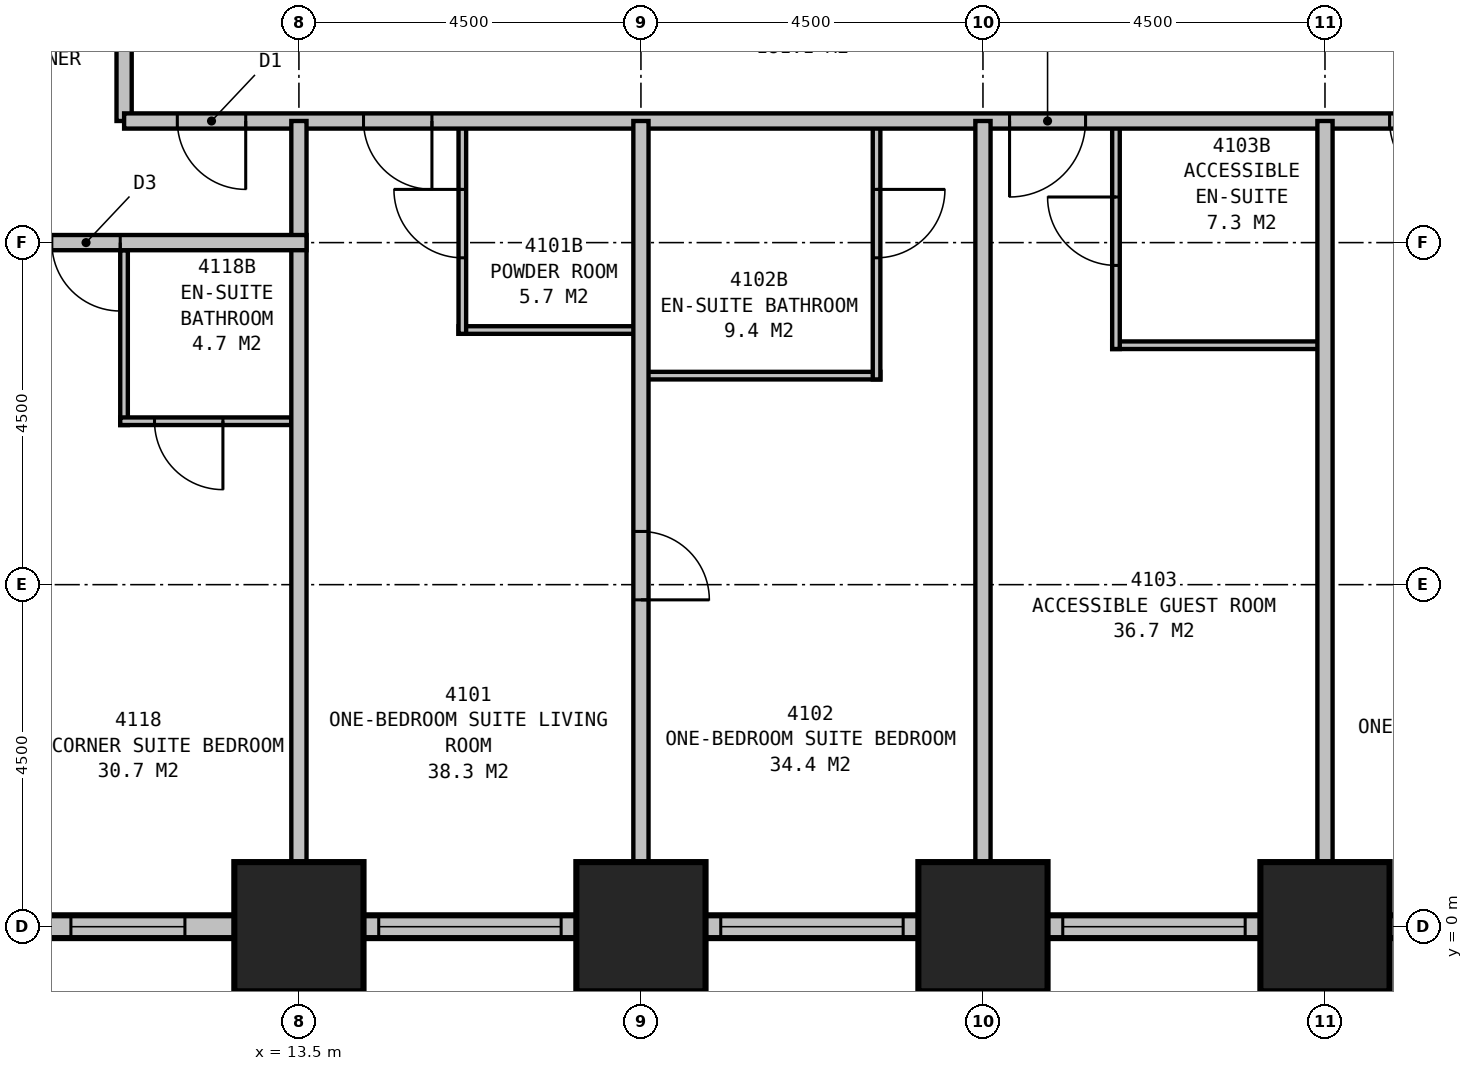
"""IFC4 building model, lengths in metres.
Left out: names, types, materials, properties, quantities, classifications, styles, units other than length and angle.
Written with IfcOpenShell. Run it as: python <this file> out.ifc"""

import sys

from ifc_helpers import new_model, si_unit, direction, frame, frame_2d, origin, origin_2d, place, context, subcontext, project, spatial, rectangle, extrude, element, fill, save


model = new_model("IFC4")
c1 = context("Model", 3, precision=1e-05, world=origin(), true_north=direction((0.0, 1.0)))
c2 = subcontext(c1, "Body", "Model", "MODEL_VIEW")
j1 = project(units=[si_unit("LENGTHUNIT", "METRE"), si_unit("PLANEANGLEUNIT", "RADIAN")], contexts=[c1])
p1 = place(None, origin())
s1 = spatial("IfcSite", under=j1, at=p1, CompositionType="ELEMENT")
p2 = place(p1, origin())
s2 = spatial("IfcBuilding", under=s1, at=p2, CompositionType="ELEMENT")
p3 = place(p2, frame((0.0, 0.0, 162.4)))
s3 = spatial("IfcBuildingStorey", under=s2, at=p3, CompositionType="ELEMENT", Elevation=162.4)
for number, where, z_axis, x_axis in (
    (1, (13.5, 0.0, 0.0), (0.0, 0.0, 1.0), (1.0, 0.0, 0.0)),
    (2, (18.0, 0.0, 0.0), (0.0, 0.0, 1.0), (1.0, 0.0, 0.0)),
    (3, (22.5, 0.0, 0.0), (0.0, 0.0, 1.0), (1.0, 0.0, 0.0)),
    (4, (27.0, 0.0, 0.0), (0.0, 0.0, 1.0), (1.0, 0.0, 0.0)),
):
    element("IfcColumn", number, at=place(p3, frame(where, z_axis=z_axis, x_axis=x_axis)), inside=s3, PredefinedType="COLUMN", context=c2, shape_type="SweptSolid", body=[
        extrude(rectangle(XDim=1.7, YDim=1.7, at=origin_2d()), origin(), (0.0, 0.0, 1.0), 3.5),
    ])
p4 = place(p3, frame((8.85, 0.0, 0.0), z_axis=(0.0, 0.0, 1.0), x_axis=(1.0, 0.0, 0.0)))
e5 = element("IfcWall", 5, at=p4, inside=s3, PredefinedType="STANDARD", context=c2, shape_type="SweptSolid", body=[
    extrude(rectangle(XDim=36.3, YDim=0.3, at=frame_2d((18.15, 0.0))), origin(), (0.0, 0.0, 1.0), 2.25),
])
p5 = place(p4, frame((1.65, 0.0, 0.5)))
e6 = element("IfcOpeningElement", 6, at=p5, cuts=e5, PredefinedType="OPENING", context=c2, shape_type="SweptSolid", body=[
    extrude(rectangle(XDim=1.5, YDim=1.6, at=frame_2d((0.75, 0.8))), frame((0.0, 0.16, 0.0), z_axis=(0.0, -1.0, 0.0), x_axis=(1.0, 0.0, 0.0)), (0.0, 0.0, 1.0), 0.32),
])
p6 = place(p4, frame((5.7, 0.0, 0.5)))
e7 = element("IfcOpeningElement", 7, at=p6, cuts=e5, PredefinedType="OPENING", context=c2, shape_type="SweptSolid", body=[
    extrude(rectangle(XDim=2.4, YDim=1.6, at=frame_2d((1.2, 0.8))), frame((0.0, 0.16, 0.0), z_axis=(0.0, -1.0, 0.0), x_axis=(1.0, 0.0, 0.0)), (0.0, 0.0, 1.0), 0.32),
])
p7 = place(p4, frame((10.2, 0.0, 0.5)))
e8 = element("IfcOpeningElement", 8, at=p7, cuts=e5, PredefinedType="OPENING", context=c2, shape_type="SweptSolid", body=[
    extrude(rectangle(XDim=2.4, YDim=1.6, at=frame_2d((1.2, 0.8))), frame((0.0, 0.16, 0.0), z_axis=(0.0, -1.0, 0.0), x_axis=(1.0, 0.0, 0.0)), (0.0, 0.0, 1.0), 0.32),
])
p8 = place(p4, frame((14.7, 0.0, 0.5)))
e9 = element("IfcOpeningElement", 9, at=p8, cuts=e5, PredefinedType="OPENING", context=c2, shape_type="SweptSolid", body=[
    extrude(rectangle(XDim=2.4, YDim=1.6, at=frame_2d((1.2, 0.8))), frame((0.0, 0.16, 0.0), z_axis=(0.0, -1.0, 0.0), x_axis=(1.0, 0.0, 0.0)), (0.0, 0.0, 1.0), 0.32),
])
p9 = place(p4, frame((19.2, 0.0, 0.5)))
e10 = element("IfcOpeningElement", 10, at=p9, cuts=e5, PredefinedType="OPENING", context=c2, shape_type="SweptSolid", body=[
    extrude(rectangle(XDim=2.4, YDim=1.6, at=frame_2d((1.2, 0.8))), frame((0.0, 0.16, 0.0), z_axis=(0.0, -1.0, 0.0), x_axis=(1.0, 0.0, 0.0)), (0.0, 0.0, 1.0), 0.32),
])
p10 = place(p4, frame((23.7, 0.0, 0.5)))
e11 = element("IfcOpeningElement", 11, at=p10, cuts=e5, PredefinedType="OPENING", context=c2, shape_type="SweptSolid", body=[
    extrude(rectangle(XDim=2.4, YDim=1.6, at=frame_2d((1.2, 0.8))), frame((0.0, 0.16, 0.0), z_axis=(0.0, -1.0, 0.0), x_axis=(1.0, 0.0, 0.0)), (0.0, 0.0, 1.0), 0.32),
])
p11 = place(p4, frame((28.2, 0.0, 0.5)))
e12 = element("IfcOpeningElement", 12, at=p11, cuts=e5, PredefinedType="OPENING", context=c2, shape_type="SweptSolid", body=[
    extrude(rectangle(XDim=2.4, YDim=1.6, at=frame_2d((1.2, 0.8))), frame((0.0, 0.16, 0.0), z_axis=(0.0, -1.0, 0.0), x_axis=(1.0, 0.0, 0.0)), (0.0, 0.0, 1.0), 0.32),
])
p12 = place(p4, frame((32.7, 0.0, 0.5)))
e13 = element("IfcOpeningElement", 13, at=p12, cuts=e5, PredefinedType="OPENING", context=c2, shape_type="SweptSolid", body=[
    extrude(rectangle(XDim=2.4, YDim=1.6, at=frame_2d((1.2, 0.8))), frame((0.0, 0.16, 0.0), z_axis=(0.0, -1.0, 0.0), x_axis=(1.0, 0.0, 0.0)), (0.0, 0.0, 1.0), 0.32),
])
p13 = place(p3, frame((11.2, 10.6, 0.0), z_axis=(0.0, 0.0, 1.0), x_axis=(1.0, 0.0, 0.0)))
e14 = element("IfcWall", 14, at=p13, inside=s3, PredefinedType="PARTITIONING", context=c2, shape_type="SweptSolid", body=[
    extrude(rectangle(XDim=27.1, YDim=0.2, at=frame_2d((13.55, 0.0))), origin(), (0.0, 0.0, 1.0), 3.25),
])
p14 = place(p13, frame((4.05, 0.0, 0.0), z_axis=(0.0, 0.0, 1.0), x_axis=(-1.0, 0.0, 0.0)))
e15 = element("IfcOpeningElement", 15, at=p14, cuts=e14, PredefinedType="OPENING", context=c2, shape_type="SweptSolid", body=[
    extrude(rectangle(XDim=0.9, YDim=2.1, at=frame_2d((0.45, 1.05))), frame((0.0, 0.11, 0.0), z_axis=(0.0, -1.0, 0.0), x_axis=(1.0, 0.0, 0.0)), (0.0, 0.0, 1.0), 0.22),
])
p15 = place(p13, frame((12.65, 0.0, 0.0), z_axis=(0.0, 0.0, 1.0), x_axis=(-1.0, 0.0, 0.0)))
e16 = element("IfcOpeningElement", 16, at=p15, cuts=e14, PredefinedType="OPENING", context=c2, shape_type="SweptSolid", body=[
    extrude(rectangle(XDim=1.0, YDim=2.1, at=frame_2d((0.5, 1.05))), frame((0.0, 0.11, 0.0), z_axis=(0.0, -1.0, 0.0), x_axis=(1.0, 0.0, 0.0)), (0.0, 0.0, 1.0), 0.22),
])
p16 = place(p13, frame((17.55, 0.0, 0.0), z_axis=(0.0, 0.0, 1.0), x_axis=(-1.0, 0.0, 0.0)))
e17 = element("IfcOpeningElement", 17, at=p16, cuts=e14, PredefinedType="OPENING", context=c2, shape_type="SweptSolid", body=[
    extrude(rectangle(XDim=0.9, YDim=2.1, at=frame_2d((0.45, 1.05))), frame((0.0, 0.11, 0.0), z_axis=(0.0, -1.0, 0.0), x_axis=(1.0, 0.0, 0.0)), (0.0, 0.0, 1.0), 0.22),
])
p17 = place(p13, frame((1.6, 0.0, 0.0), z_axis=(0.0, 0.0, 1.0), x_axis=(-1.0, 0.0, 0.0)))
e18 = element("IfcOpeningElement", 18, at=p17, cuts=e14, PredefinedType="OPENING", context=c2, shape_type="SweptSolid", body=[
    extrude(rectangle(XDim=0.9, YDim=2.1, at=frame_2d((0.45, 1.05))), frame((0.0, 0.11, 0.0), z_axis=(0.0, -1.0, 0.0), x_axis=(1.0, 0.0, 0.0)), (0.0, 0.0, 1.0), 0.22),
])
p18 = place(p13, frame((26.4, 0.0, 0.0), z_axis=(0.0, 0.0, 1.0), x_axis=(-1.0, 0.0, 0.0)))
e19 = element("IfcOpeningElement", 19, at=p18, cuts=e14, PredefinedType="OPENING", context=c2, shape_type="SweptSolid", body=[
    extrude(rectangle(XDim=0.9, YDim=2.1, at=frame_2d((0.45, 1.05))), frame((0.0, 0.11, 0.0), z_axis=(0.0, -1.0, 0.0), x_axis=(1.0, 0.0, 0.0)), (0.0, 0.0, 1.0), 0.22),
])
p19 = place(p3, frame((11.2, 10.6, 0.0), z_axis=(0.0, 0.0, 1.0), x_axis=(0.0, 1.0, 0.0)))
e20 = element("IfcWall", 20, at=p19, inside=s3, PredefinedType="PARTITIONING", context=c2, shape_type="SweptSolid", body=[
    extrude(rectangle(XDim=18.7, YDim=0.2, at=frame_2d((9.35, 0.0))), origin(), (0.0, 0.0, 1.0), 3.25),
])
p20 = place(p19, frame((6.05, 0.0, 0.0)))
e21 = element("IfcOpeningElement", 21, at=p20, cuts=e20, PredefinedType="OPENING", context=c2, shape_type="SweptSolid", body=[
    extrude(rectangle(XDim=0.9, YDim=2.1, at=frame_2d((0.45, 1.05))), frame((0.0, 0.11, 0.0), z_axis=(0.0, -1.0, 0.0), x_axis=(1.0, 0.0, 0.0)), (0.0, 0.0, 1.0), 0.22),
])
p21 = place(p19, frame((10.55, 0.0, 0.0)))
e22 = element("IfcOpeningElement", 22, at=p21, cuts=e20, PredefinedType="OPENING", context=c2, shape_type="SweptSolid", body=[
    extrude(rectangle(XDim=0.9, YDim=2.1, at=frame_2d((0.45, 1.05))), frame((0.0, 0.11, 0.0), z_axis=(0.0, -1.0, 0.0), x_axis=(1.0, 0.0, 0.0)), (0.0, 0.0, 1.0), 0.22),
])
p22 = place(p19, frame((14.65, 0.0, 0.0)))
e23 = element("IfcOpeningElement", 23, at=p22, cuts=e20, PredefinedType="OPENING", context=c2, shape_type="SweptSolid", body=[
    extrude(rectangle(XDim=1.0, YDim=2.1, at=frame_2d((0.5, 1.05))), frame((0.0, 0.11, 0.0), z_axis=(0.0, -1.0, 0.0), x_axis=(1.0, 0.0, 0.0)), (0.0, 0.0, 1.0), 0.22),
])
p23 = place(p3, frame((18.0, 10.6, 0.0), z_axis=(0.0, 0.0, 1.0), x_axis=(0.0, -1.0, 0.0)))
e24 = element("IfcWall", 24, at=p23, inside=s3, PredefinedType="PARTITIONING", context=c2, shape_type="SweptSolid", body=[
    extrude(rectangle(XDim=10.6, YDim=0.2, at=frame_2d((5.3, 0.0))), origin(), (0.0, 0.0, 1.0), 2.25),
])
p24 = place(p23, frame((5.4, 0.0, 0.0)))
e25 = element("IfcOpeningElement", 25, at=p24, cuts=e24, PredefinedType="OPENING", context=c2, shape_type="SweptSolid", body=[
    extrude(rectangle(XDim=0.9, YDim=2.1, at=frame_2d((0.45, 1.05))), frame((0.0, 0.11, 0.0), z_axis=(0.0, -1.0, 0.0), x_axis=(1.0, 0.0, 0.0)), (0.0, 0.0, 1.0), 0.22),
])
for number, where, z_axis, x_axis in (
    (26, (22.5, 10.6, 0.0), (0.0, 0.0, 1.0), (0.0, -1.0, 0.0)),
    (27, (27.0, 10.6, 0.0), (0.0, 0.0, 1.0), (0.0, -1.0, 0.0)),
):
    element("IfcWall", number, at=place(p3, frame(where, z_axis=z_axis, x_axis=x_axis)), inside=s3, PredefinedType="PARTITIONING", context=c2, shape_type="SweptSolid", body=[
        extrude(rectangle(XDim=10.6, YDim=0.2, at=frame_2d((5.3, 0.0))), origin(), (0.0, 0.0, 1.0), 2.25),
    ])
p25 = place(p3, frame((15.6, 7.85, 0.0), z_axis=(0.0, 0.0, 1.0), x_axis=(1.0, 0.0, 0.0)))
e28 = element("IfcWall", 28, at=p25, inside=s3, PredefinedType="PLUMBINGWALL", context=c2, shape_type="SweptSolid", body=[
    extrude(rectangle(XDim=2.4, YDim=0.1, at=frame_2d((1.2, 0.0))), origin(), (0.0, 0.0, 1.0), 3.25),
])
p26 = place(p3, frame((15.65, 10.6, 0.0), z_axis=(0.0, 0.0, 1.0), x_axis=(0.0, -1.0, 0.0)))
e29 = element("IfcWall", 29, at=p26, inside=s3, PredefinedType="PLUMBINGWALL", context=c2, shape_type="SweptSolid", body=[
    extrude(rectangle(XDim=2.8, YDim=0.1, at=frame_2d((1.4, 0.0))), origin(), (0.0, 0.0, 1.0), 3.25),
])
p27 = place(p26, frame((1.8, 0.0, 0.0), z_axis=(0.0, 0.0, 1.0), x_axis=(-1.0, 0.0, 0.0)))
e30 = element("IfcOpeningElement", 30, at=p27, cuts=e29, PredefinedType="OPENING", context=c2, shape_type="SweptSolid", body=[
    extrude(rectangle(XDim=0.9, YDim=2.1, at=frame_2d((0.45, 1.05))), frame((0.0, 0.06, 0.0), z_axis=(0.0, -1.0, 0.0), x_axis=(1.0, 0.0, 0.0)), (0.0, 0.0, 1.0), 0.12),
])
p28 = place(p3, frame((18.0, 7.25, 0.0), z_axis=(0.0, 0.0, 1.0), x_axis=(1.0, 0.0, 0.0)))
e31 = element("IfcWall", 31, at=p28, inside=s3, PredefinedType="PLUMBINGWALL", context=c2, shape_type="SweptSolid", body=[
    extrude(rectangle(XDim=3.15, YDim=0.1, at=frame_2d((1.575, 0.0))), origin(), (0.0, 0.0, 1.0), 3.25),
])
p29 = place(p3, frame((21.1, 10.6, 0.0), z_axis=(0.0, 0.0, 1.0), x_axis=(0.0, -1.0, 0.0)))
e32 = element("IfcWall", 32, at=p29, inside=s3, PredefinedType="PLUMBINGWALL", context=c2, shape_type="SweptSolid", body=[
    extrude(rectangle(XDim=3.4, YDim=0.1, at=frame_2d((1.7, 0.0))), origin(), (0.0, 0.0, 1.0), 3.25),
])
p30 = place(p29, frame((0.9, 0.0, 0.0)))
e33 = element("IfcOpeningElement", 33, at=p30, cuts=e32, PredefinedType="OPENING", context=c2, shape_type="SweptSolid", body=[
    extrude(rectangle(XDim=0.9, YDim=2.1, at=frame_2d((0.45, 1.05))), frame((0.0, 0.06, 0.0), z_axis=(0.0, -1.0, 0.0), x_axis=(1.0, 0.0, 0.0)), (0.0, 0.0, 1.0), 0.12),
])
p31 = place(p3, frame((24.2, 7.65, 0.0), z_axis=(0.0, 0.0, 1.0), x_axis=(1.0, 0.0, 0.0)))
e34 = element("IfcWall", 34, at=p31, inside=s3, PredefinedType="PLUMBINGWALL", context=c2, shape_type="SweptSolid", body=[
    extrude(rectangle(XDim=2.8, YDim=0.1, at=frame_2d((1.4, 0.0))), origin(), (0.0, 0.0, 1.0), 3.25),
])
p32 = place(p3, frame((24.25, 10.6, 0.0), z_axis=(0.0, 0.0, 1.0), x_axis=(0.0, -1.0, 0.0)))
e35 = element("IfcWall", 35, at=p32, inside=s3, PredefinedType="PLUMBINGWALL", context=c2, shape_type="SweptSolid", body=[
    extrude(rectangle(XDim=3.0, YDim=0.1, at=frame_2d((1.5, 0.0))), origin(), (0.0, 0.0, 1.0), 3.25),
])
p33 = place(p32, frame((1.9, 0.0, 0.0), z_axis=(0.0, 0.0, 1.0), x_axis=(-1.0, 0.0, 0.0)))
e36 = element("IfcOpeningElement", 36, at=p33, cuts=e35, PredefinedType="OPENING", context=c2, shape_type="SweptSolid", body=[
    extrude(rectangle(XDim=0.9, YDim=2.1, at=frame_2d((0.45, 1.05))), frame((0.0, 0.06, 0.0), z_axis=(0.0, -1.0, 0.0), x_axis=(1.0, 0.0, 0.0)), (0.0, 0.0, 1.0), 0.12),
])
p34 = place(p3, frame((13.5, 10.6, 0.0), z_axis=(0.0, 0.0, 1.0), x_axis=(0.0, -1.0, 0.0)))
e37 = element("IfcWall", 37, at=p34, inside=s3, PredefinedType="PARTITIONING", context=c2, shape_type="SweptSolid", body=[
    extrude(rectangle(XDim=10.6, YDim=0.2, at=frame_2d((5.3, 0.0))), origin(), (0.0, 0.0, 1.0), 2.25),
])
p35 = place(p3, frame((13.6, 9.0, 0.0), z_axis=(0.0, 0.0, 1.0), x_axis=(-1.0, 0.0, 0.0)))
e38 = element("IfcWall", 38, at=p35, inside=s3, PredefinedType="PARTITIONING", context=c2, shape_type="SweptSolid", body=[
    extrude(rectangle(XDim=4.6, YDim=0.2, at=frame_2d((2.3, 0.0))), origin(), (0.0, 0.0, 1.0), 3.25),
])
p36 = place(p35, frame((2.451, 0.0, 0.0)))
e39 = element("IfcOpeningElement", 39, at=p36, cuts=e38, PredefinedType="OPENING", context=c2, shape_type="SweptSolid", body=[
    extrude(rectangle(XDim=0.9, YDim=2.1, at=frame_2d((0.45, 1.05))), frame((0.0, 0.11, 0.0), z_axis=(0.0, -1.0, 0.0), x_axis=(1.0, 0.0, 0.0)), (0.0, 0.0, 1.0), 0.22),
])
p37 = place(p3, frame((11.199, 8.9, 0.0), z_axis=(0.0, 0.0, 1.0), x_axis=(0.0, -1.0, 0.0)))
e40 = element("IfcWall", 40, at=p37, inside=s3, PredefinedType="PLUMBINGWALL", context=c2, shape_type="SweptSolid", body=[
    extrude(rectangle(XDim=2.3, YDim=0.1, at=frame_2d((1.15, 0.0))), origin(), (0.0, 0.0, 1.0), 3.25),
])
p38 = place(p3, frame((13.4, 6.65, 0.0), z_axis=(0.0, 0.0, 1.0), x_axis=(-1.0, 0.0, 0.0)))
e41 = element("IfcWall", 41, at=p38, inside=s3, PredefinedType="PLUMBINGWALL", context=c2, shape_type="SweptSolid", body=[
    extrude(rectangle(XDim=2.251, YDim=0.1, at=frame_2d((1.125, 0.0))), origin(), (0.0, 0.0, 1.0), 3.25),
])
p39 = place(p38, frame((0.9, 0.0, 0.0)))
e42 = element("IfcOpeningElement", 42, at=p39, cuts=e41, PredefinedType="OPENING", context=c2, shape_type="SweptSolid", body=[
    extrude(rectangle(XDim=0.9, YDim=2.1, at=frame_2d((0.45, 1.05))), frame((0.0, 0.06, 0.0), z_axis=(0.0, -1.0, 0.0), x_axis=(1.0, 0.0, 0.0)), (0.0, 0.0, 1.0), 0.12),
])
p40 = place(p5, origin())
e43 = element("IfcWindow", 43, at=p40, inside=s3, PartitioningType="SINGLE_PANEL", PredefinedType="WINDOW", context=c2, shape_type="SweptSolid", body=[
    extrude(rectangle(XDim=1.5, YDim=1.6, at=frame_2d((0.75, 0.8))), frame((0.0, 0.03, 0.0), z_axis=(0.0, -1.0, 0.0), x_axis=(1.0, 0.0, 0.0)), (0.0, 0.0, 1.0), 0.06),
])
fill(e6, e43)
p41 = place(p6, origin())
e44 = element("IfcWindow", 44, at=p41, inside=s3, PartitioningType="SINGLE_PANEL", PredefinedType="WINDOW", context=c2, shape_type="SweptSolid", body=[
    extrude(rectangle(XDim=2.4, YDim=1.6, at=frame_2d((1.2, 0.8))), frame((0.0, 0.03, 0.0), z_axis=(0.0, -1.0, 0.0), x_axis=(1.0, 0.0, 0.0)), (0.0, 0.0, 1.0), 0.06),
])
fill(e7, e44)
p42 = place(p7, origin())
e45 = element("IfcWindow", 45, at=p42, inside=s3, PartitioningType="SINGLE_PANEL", PredefinedType="WINDOW", context=c2, shape_type="SweptSolid", body=[
    extrude(rectangle(XDim=2.4, YDim=1.6, at=frame_2d((1.2, 0.8))), frame((0.0, 0.03, 0.0), z_axis=(0.0, -1.0, 0.0), x_axis=(1.0, 0.0, 0.0)), (0.0, 0.0, 1.0), 0.06),
])
fill(e8, e45)
p43 = place(p8, origin())
e46 = element("IfcWindow", 46, at=p43, inside=s3, PartitioningType="SINGLE_PANEL", PredefinedType="WINDOW", context=c2, shape_type="SweptSolid", body=[
    extrude(rectangle(XDim=2.4, YDim=1.6, at=frame_2d((1.2, 0.8))), frame((0.0, 0.03, 0.0), z_axis=(0.0, -1.0, 0.0), x_axis=(1.0, 0.0, 0.0)), (0.0, 0.0, 1.0), 0.06),
])
fill(e9, e46)
p44 = place(p14, origin())
e47 = element("IfcDoor", 47, at=p44, inside=s3, OperationType="SINGLE_SWING_LEFT", PredefinedType="DOOR", context=c2, shape_type="SweptSolid", body=[
    extrude(rectangle(XDim=0.9, YDim=2.1, at=frame_2d((0.45, 1.05))), frame((0.0, 0.025, 0.0), z_axis=(0.0, -1.0, 0.0), x_axis=(1.0, 0.0, 0.0)), (0.0, 0.0, 1.0), 0.05),
])
fill(e15, e47)
p45 = place(p15, origin())
e48 = element("IfcDoor", 48, at=p45, inside=s3, OperationType="SINGLE_SWING_RIGHT", PredefinedType="DOOR", context=c2, shape_type="SweptSolid", body=[
    extrude(rectangle(XDim=1.0, YDim=2.1, at=frame_2d((0.5, 1.05))), frame((0.0, 0.025, 0.0), z_axis=(0.0, -1.0, 0.0), x_axis=(1.0, 0.0, 0.0)), (0.0, 0.0, 1.0), 0.05),
])
fill(e16, e48)
p46 = place(p16, origin())
e49 = element("IfcDoor", 49, at=p46, inside=s3, OperationType="SINGLE_SWING_LEFT", PredefinedType="DOOR", context=c2, shape_type="SweptSolid", body=[
    extrude(rectangle(XDim=0.9, YDim=2.1, at=frame_2d((0.45, 1.05))), frame((0.0, 0.025, 0.0), z_axis=(0.0, -1.0, 0.0), x_axis=(1.0, 0.0, 0.0)), (0.0, 0.0, 1.0), 0.05),
])
fill(e17, e49)
p47 = place(p17, origin())
e50 = element("IfcDoor", 50, at=p47, inside=s3, OperationType="SINGLE_SWING_LEFT", PredefinedType="DOOR", context=c2, shape_type="SweptSolid", body=[
    extrude(rectangle(XDim=0.9, YDim=2.1, at=frame_2d((0.45, 1.05))), frame((0.0, 0.025, 0.0), z_axis=(0.0, -1.0, 0.0), x_axis=(1.0, 0.0, 0.0)), (0.0, 0.0, 1.0), 0.05),
])
fill(e18, e50)
p48 = place(p24, origin())
e51 = element("IfcDoor", 51, at=p48, inside=s3, OperationType="SINGLE_SWING_RIGHT", PredefinedType="DOOR", context=c2, shape_type="SweptSolid", body=[
    extrude(rectangle(XDim=0.9, YDim=2.1, at=frame_2d((0.45, 1.05))), frame((0.0, 0.025, 0.0), z_axis=(0.0, -1.0, 0.0), x_axis=(1.0, 0.0, 0.0)), (0.0, 0.0, 1.0), 0.05),
])
fill(e25, e51)
p49 = place(p27, origin())
e52 = element("IfcDoor", 52, at=p49, inside=s3, OperationType="SINGLE_SWING_RIGHT", PredefinedType="DOOR", context=c2, shape_type="SweptSolid", body=[
    extrude(rectangle(XDim=0.9, YDim=2.1, at=frame_2d((0.45, 1.05))), frame((0.0, 0.025, 0.0), z_axis=(0.0, -1.0, 0.0), x_axis=(1.0, 0.0, 0.0)), (0.0, 0.0, 1.0), 0.05),
])
fill(e30, e52)
p50 = place(p30, origin())
e53 = element("IfcDoor", 53, at=p50, inside=s3, OperationType="SINGLE_SWING_LEFT", PredefinedType="DOOR", context=c2, shape_type="SweptSolid", body=[
    extrude(rectangle(XDim=0.9, YDim=2.1, at=frame_2d((0.45, 1.05))), frame((0.0, 0.025, 0.0), z_axis=(0.0, -1.0, 0.0), x_axis=(1.0, 0.0, 0.0)), (0.0, 0.0, 1.0), 0.05),
])
fill(e33, e53)
p51 = place(p33, origin())
e54 = element("IfcDoor", 54, at=p51, inside=s3, OperationType="SINGLE_SWING_RIGHT", PredefinedType="DOOR", context=c2, shape_type="SweptSolid", body=[
    extrude(rectangle(XDim=0.9, YDim=2.1, at=frame_2d((0.45, 1.05))), frame((0.0, 0.025, 0.0), z_axis=(0.0, -1.0, 0.0), x_axis=(1.0, 0.0, 0.0)), (0.0, 0.0, 1.0), 0.05),
])
fill(e36, e54)
p52 = place(p36, origin())
e55 = element("IfcDoor", 55, at=p52, inside=s3, OperationType="SINGLE_SWING_LEFT", PredefinedType="DOOR", context=c2, shape_type="SweptSolid", body=[
    extrude(rectangle(XDim=0.9, YDim=2.1, at=frame_2d((0.45, 1.05))), frame((0.0, 0.025, 0.0), z_axis=(0.0, -1.0, 0.0), x_axis=(1.0, 0.0, 0.0)), (0.0, 0.0, 1.0), 0.05),
])
fill(e39, e55)
p53 = place(p39, origin())
e56 = element("IfcDoor", 56, at=p53, inside=s3, OperationType="SINGLE_SWING_LEFT", PredefinedType="DOOR", context=c2, shape_type="SweptSolid", body=[
    extrude(rectangle(XDim=0.9, YDim=2.1, at=frame_2d((0.45, 1.05))), frame((0.0, 0.025, 0.0), z_axis=(0.0, -1.0, 0.0), x_axis=(1.0, 0.0, 0.0)), (0.0, 0.0, 1.0), 0.05),
])
fill(e42, e56)
save(model, sys.argv[1])
